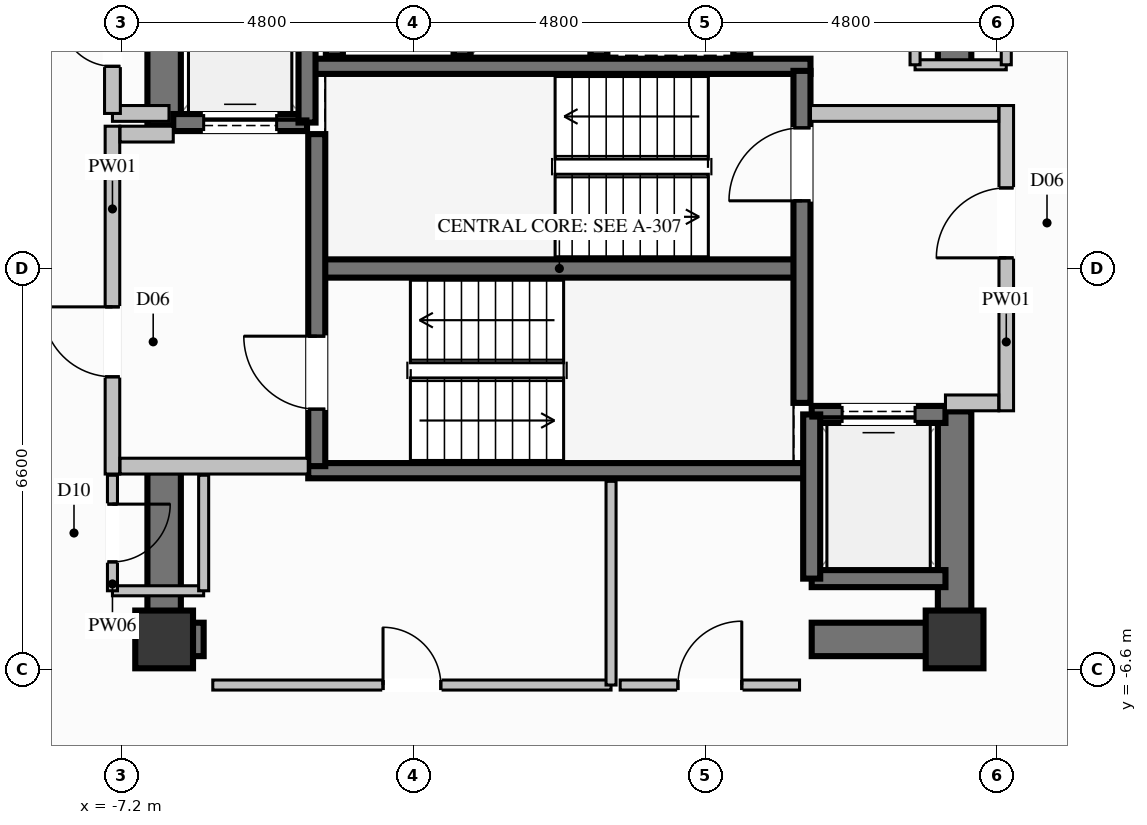
"""IFC4 building model, lengths in metres.
Left out: names, types, materials, properties, quantities, classifications, styles, units other than length and angle.
Written with IfcOpenShell. Run it as: python <this file> out.ifc"""

import sys

from ifc_helpers import new_model, si_unit, direction, frame, frame_2d, origin, origin_2d, place, context, subcontext, project, spatial, rectangle, extrude, element, fill, save


model = new_model("IFC4")
c1 = context("Model", 3, precision=1e-05, world=origin(), true_north=direction((0.0, 1.0)))
c2 = subcontext(c1, "Body", "Model", "MODEL_VIEW")
j1 = project(units=[si_unit("LENGTHUNIT", "METRE"), si_unit("PLANEANGLEUNIT", "RADIAN")], contexts=[c1])
p1 = place(None, origin())
s1 = spatial("IfcSite", under=j1, at=p1, CompositionType="ELEMENT")
p2 = place(p1, origin())
s2 = spatial("IfcBuilding", under=s1, at=p2, CompositionType="ELEMENT")
p3 = place(p2, frame((0.0, 0.0, 187.6)))
s3 = spatial("IfcBuildingStorey", under=s2, at=p3, CompositionType="ELEMENT", Elevation=187.6)
for number, where, z_axis, x_axis in (
    (1, (-6.5, -6.1, 0.0), (0.0, 0.0, 1.0), (1.0, 0.0, 0.0)),
    (2, (6.5, -6.1, 0.0), (0.0, 0.0, 1.0), (1.0, 0.0, 0.0)),
):
    element("IfcColumn", number, at=place(p3, frame(where, z_axis=z_axis, x_axis=x_axis)), inside=s3, PredefinedType="COLUMN", context=c2, shape_type="SweptSolid", body=[
        extrude(rectangle(XDim=0.95, YDim=0.95, at=origin_2d()), origin(), (0.0, 0.0, 1.0), 3.6),
    ])
p4 = place(p3, frame((-3.99, 0.0, 0.0), z_axis=(0.0, 0.0, 1.0), x_axis=(1.0, 0.0, 0.0)))
e3 = element("IfcWall", 3, at=p4, inside=s3, PredefinedType="SHEAR", context=c2, shape_type="SweptSolid", body=[
    extrude(rectangle(XDim=7.98, YDim=0.3, at=frame_2d((3.99, 0.0))), origin(), (0.0, 0.0, 1.0), 3.6),
])
for number, where, z_axis, x_axis in (
    (4, (-4.13, -3.325, 0.0), (0.0, 0.0, 1.0), (1.0, 0.0, 0.0)),
    (5, (-4.13, 3.325, 0.0), (0.0, 0.0, 1.0), (1.0, 0.0, 0.0)),
):
    element("IfcWall", number, at=place(p3, frame(where, z_axis=z_axis, x_axis=x_axis)), inside=s3, PredefinedType="SOLIDWALL", context=c2, shape_type="SweptSolid", body=[
        extrude(rectangle(XDim=8.26, YDim=0.25, at=frame_2d((4.13, 0.0))), origin(), (0.0, 0.0, 1.0), 3.6),
    ])
p5 = place(p3, frame((-6.225, -6.1, 0.0), z_axis=(0.0, 0.0, 1.0), x_axis=(1.0, 0.0, 0.0)))
e6 = element("IfcWall", 6, at=p5, inside=s3, PredefinedType="SHEAR", context=c2, shape_type="SweptSolid", body=[
    extrude(rectangle(XDim=0.375, YDim=0.55, at=frame_2d((0.188, 0.0))), origin(), (0.0, 0.0, 1.0), 3.6),
])
p6 = place(p3, frame((4.15, -6.1, 0.0), z_axis=(0.0, 0.0, 1.0), x_axis=(1.0, 0.0, 0.0)))
e7 = element("IfcWall", 7, at=p6, inside=s3, PredefinedType="SHEAR", context=c2, shape_type="SweptSolid", body=[
    extrude(rectangle(XDim=2.075, YDim=0.55, at=frame_2d((1.038, 0.0))), origin(), (0.0, 0.0, 1.0), 3.6),
])
p7 = place(p3, frame((-6.5, 2.35, 0.0), z_axis=(0.0, 0.0, 1.0), x_axis=(0.0, 1.0, 0.0)))
e8 = element("IfcWall", 8, at=p7, inside=s3, PredefinedType="SHEAR", context=c2, shape_type="SweptSolid", body=[
    extrude(rectangle(XDim=4.025, YDim=0.55, at=frame_2d((2.012, 0.0))), origin(), (0.0, 0.0, 1.0), 3.6),
])
p8 = place(p3, frame((-6.5, -6.375, 0.0), z_axis=(0.0, 0.0, 1.0), x_axis=(0.0, 1.0, 0.0)))
e9 = element("IfcWall", 9, at=p8, inside=s3, PredefinedType="SHEAR", context=c2, shape_type="SweptSolid", body=[
    extrude(rectangle(XDim=3.025, YDim=0.55, at=frame_2d((1.512, 0.0))), origin(), (0.0, 0.0, 1.0), 3.6),
])
p9 = place(p3, frame((6.5, -6.375, 0.0), z_axis=(0.0, 0.0, 1.0), x_axis=(0.0, 1.0, 0.0)))
e10 = element("IfcWall", 10, at=p9, inside=s3, PredefinedType="SHEAR", context=c2, shape_type="SweptSolid", body=[
    extrude(rectangle(XDim=4.025, YDim=0.55, at=frame_2d((2.012, 0.0))), origin(), (0.0, 0.0, 1.0), 3.6),
])
p10 = place(p3, frame((6.5, 3.35, 0.0), z_axis=(0.0, 0.0, 1.0), x_axis=(0.0, 1.0, 0.0)))
e11 = element("IfcWall", 11, at=p10, inside=s3, PredefinedType="SHEAR", context=c2, shape_type="SweptSolid", body=[
    extrude(rectangle(XDim=3.025, YDim=0.55, at=frame_2d((1.512, 0.0))), origin(), (0.0, 0.0, 1.0), 3.6),
])
for number, where, z_axis, x_axis in (
    (12, (-3.7, 6.0, 0.0), (0.0, 0.0, 1.0), (0.0, -1.0, 0.0)),
    (13, (-1.6, 3.5, 0.0), (0.0, 0.0, 1.0), (0.0, 1.0, 0.0)),
    (14, (0.65, 3.5, 0.0), (0.0, 0.0, 1.0), (0.0, 1.0, 0.0)),
    (15, (3.0, 3.5, 0.0), (0.0, 0.0, 1.0), (0.0, 1.0, 0.0)),
):
    element("IfcWall", number, at=place(p3, frame(where, z_axis=z_axis, x_axis=x_axis)), inside=s3, PredefinedType="SOLIDWALL", context=c2, shape_type="SweptSolid", body=[
        extrude(rectangle(XDim=2.5, YDim=0.28, at=frame_2d((1.25, 0.0))), origin(), (0.0, 0.0, 1.0), 3.36),
    ])
p11 = place(p3, frame((-6.35, 2.4, 0.0), z_axis=(0.0, 0.0, 1.0), x_axis=(1.0, 0.0, 0.0)))
e16 = element("IfcWall", 16, at=p11, inside=s3, PredefinedType="SOLIDWALL", context=c2, shape_type="SweptSolid", body=[
    extrude(rectangle(XDim=2.2, YDim=0.28, at=frame_2d((1.1, 0.0))), origin(), (0.0, 0.0, 1.0), 3.36),
])
p12 = place(p11, frame((0.5, 0.0, 0.0)))
e17 = element("IfcOpeningElement", 17, at=p12, cuts=e16, PredefinedType="OPENING", context=c2, shape_type="SweptSolid", body=[
    extrude(rectangle(XDim=1.2, YDim=2.2, at=frame_2d((0.6, 1.1))), frame((0.0, 0.15, 0.0), z_axis=(0.0, -1.0, 0.0), x_axis=(1.0, 0.0, 0.0)), (0.0, 0.0, 1.0), 0.3),
])
p13 = place(p3, frame((-4.15, 2.4, 0.0), z_axis=(0.0, 0.0, 1.0), x_axis=(0.0, 1.0, 0.0)))
e18 = element("IfcWall", 18, at=p13, inside=s3, PredefinedType="SOLIDWALL", context=c2, shape_type="SweptSolid", body=[
    extrude(rectangle(XDim=2.7, YDim=0.28, at=frame_2d((1.35, 0.0))), origin(), (0.0, 0.0, 1.0), 3.36),
])
p14 = place(p3, frame((4.15, -5.1, 0.0), z_axis=(0.0, 0.0, 1.0), x_axis=(1.0, 0.0, 0.0)))
e19 = element("IfcWall", 19, at=p14, inside=s3, PredefinedType="SOLIDWALL", context=c2, shape_type="SweptSolid", body=[
    extrude(rectangle(XDim=2.2, YDim=0.28, at=frame_2d((1.1, 0.0))), origin(), (0.0, 0.0, 1.0), 3.36),
])
p15 = place(p3, frame((6.35, -2.4, 0.0), z_axis=(0.0, 0.0, 1.0), x_axis=(-1.0, 0.0, 0.0)))
e20 = element("IfcWall", 20, at=p15, inside=s3, PredefinedType="SOLIDWALL", context=c2, shape_type="SweptSolid", body=[
    extrude(rectangle(XDim=2.2, YDim=0.28, at=frame_2d((1.1, 0.0))), origin(), (0.0, 0.0, 1.0), 3.36),
])
p16 = place(p15, frame((0.5, 0.0, 0.0)))
e21 = element("IfcOpeningElement", 21, at=p16, cuts=e20, PredefinedType="OPENING", context=c2, shape_type="SweptSolid", body=[
    extrude(rectangle(XDim=1.2, YDim=2.2, at=frame_2d((0.6, 1.1))), frame((0.0, 0.15, 0.0), z_axis=(0.0, -1.0, 0.0), x_axis=(1.0, 0.0, 0.0)), (0.0, 0.0, 1.0), 0.3),
])
p17 = place(p3, frame((4.15, -2.4, 0.0), z_axis=(0.0, 0.0, 1.0), x_axis=(0.0, -1.0, 0.0)))
e22 = element("IfcWall", 22, at=p17, inside=s3, PredefinedType="SOLIDWALL", context=c2, shape_type="SweptSolid", body=[
    extrude(rectangle(XDim=2.7, YDim=0.28, at=frame_2d((1.35, 0.0))), origin(), (0.0, 0.0, 1.0), 3.36),
])
p18 = place(p3, frame((-3.99, -3.25, 0.0), z_axis=(0.0, 0.0, 1.0), x_axis=(0.0, 1.0, 0.0)))
e23 = element("IfcWall", 23, at=p18, inside=s3, PredefinedType="SOLIDWALL", context=c2, shape_type="SweptSolid", body=[
    extrude(rectangle(XDim=5.46, YDim=0.28, at=frame_2d((2.73, 0.0))), origin(), (0.0, 0.0, 1.0), 3.36),
])
p19 = place(p18, frame((0.937, 0.0, 0.0)))
e24 = element("IfcOpeningElement", 24, at=p19, cuts=e23, PredefinedType="OPENING", context=c2, shape_type="SweptSolid", body=[
    extrude(rectangle(XDim=1.2, YDim=2.2, at=frame_2d((0.6, 1.1))), frame((0.0, 0.15, 0.0), z_axis=(0.0, -1.0, 0.0), x_axis=(1.0, 0.0, 0.0)), (0.0, 0.0, 1.0), 0.3),
])
p20 = place(p3, frame((3.99, -2.21, 0.0), z_axis=(0.0, 0.0, 1.0), x_axis=(0.0, 1.0, 0.0)))
e25 = element("IfcWall", 25, at=p20, inside=s3, PredefinedType="SOLIDWALL", context=c2, shape_type="SweptSolid", body=[
    extrude(rectangle(XDim=5.46, YDim=0.28, at=frame_2d((2.73, 0.0))), origin(), (0.0, 0.0, 1.0), 3.36),
])
p21 = place(p20, frame((3.323, 0.0, 0.0)))
e26 = element("IfcOpeningElement", 26, at=p21, cuts=e25, PredefinedType="OPENING", context=c2, shape_type="SweptSolid", body=[
    extrude(rectangle(XDim=1.2, YDim=2.2, at=frame_2d((0.6, 1.1))), frame((0.0, 0.15, 0.0), z_axis=(0.0, -1.0, 0.0), x_axis=(1.0, 0.0, 0.0)), (0.0, 0.0, 1.0), 0.3),
])
p22 = place(p3, frame((-7.35, -3.38, 0.0), z_axis=(0.0, 0.0, 1.0), x_axis=(0.0, 1.0, 0.0)))
e27 = element("IfcWall", 27, at=p22, inside=s3, PredefinedType="PARTITIONING", context=c2, shape_type="SweptSolid", body=[
    extrude(rectangle(XDim=5.72, YDim=0.24, at=frame_2d((2.86, 0.0))), origin(), (0.0, 0.0, 1.0), 2.445),
])
p23 = place(p22, frame((1.599, 0.0, 0.0)))
e28 = element("IfcOpeningElement", 28, at=p23, cuts=e27, PredefinedType="OPENING", context=c2, shape_type="SweptSolid", body=[
    extrude(rectangle(XDim=1.15, YDim=2.2, at=frame_2d((0.575, 1.1))), frame((0.0, 0.13, 0.0), z_axis=(0.0, -1.0, 0.0), x_axis=(1.0, 0.0, 0.0)), (0.0, 0.0, 1.0), 0.26),
])
p24 = place(p3, frame((-7.225, -3.25, 0.0), z_axis=(0.0, 0.0, 1.0), x_axis=(1.0, 0.0, 0.0)))
e29 = element("IfcWall", 29, at=p24, inside=s3, PredefinedType="PARTITIONING", context=c2, shape_type="SweptSolid", body=[
    extrude(rectangle(XDim=3.095, YDim=0.26, at=frame_2d((1.548, 0.0))), origin(), (0.0, 0.0, 1.0), 3.36),
])
p25 = place(p3, frame((-7.225, 2.21, 0.0), z_axis=(0.0, 0.0, 1.0), x_axis=(1.0, 0.0, 0.0)))
e30 = element("IfcWall", 30, at=p25, inside=s3, PredefinedType="PARTITIONING", context=c2, shape_type="SweptSolid", body=[
    extrude(rectangle(XDim=0.875, YDim=0.26, at=frame_2d((0.438, 0.0))), origin(), (0.0, 0.0, 1.0), 3.36),
])
p26 = place(p3, frame((7.35, -2.34, 0.0), z_axis=(0.0, 0.0, 1.0), x_axis=(0.0, 1.0, 0.0)))
e31 = element("IfcWall", 31, at=p26, inside=s3, PredefinedType="PARTITIONING", context=c2, shape_type="SweptSolid", body=[
    extrude(rectangle(XDim=5.02, YDim=0.24, at=frame_2d((2.51, 0.0))), origin(), (0.0, 0.0, 1.0), 2.445),
])
p27 = place(p26, frame((2.515, 0.0, 0.0)))
e32 = element("IfcOpeningElement", 32, at=p27, cuts=e31, PredefinedType="OPENING", context=c2, shape_type="SweptSolid", body=[
    extrude(rectangle(XDim=1.15, YDim=2.2, at=frame_2d((0.575, 1.1))), frame((0.0, 0.13, 0.0), z_axis=(0.0, -1.0, 0.0), x_axis=(1.0, 0.0, 0.0)), (0.0, 0.0, 1.0), 0.26),
])
p28 = place(p3, frame((6.35, -2.21, 0.0), z_axis=(0.0, 0.0, 1.0), x_axis=(1.0, 0.0, 0.0)))
e33 = element("IfcWall", 33, at=p28, inside=s3, PredefinedType="PARTITIONING", context=c2, shape_type="SweptSolid", body=[
    extrude(rectangle(XDim=0.875, YDim=0.26, at=frame_2d((0.438, 0.0))), origin(), (0.0, 0.0, 1.0), 3.36),
])
p29 = place(p3, frame((4.13, 2.55, 0.0), z_axis=(0.0, 0.0, 1.0), x_axis=(1.0, 0.0, 0.0)))
e34 = element("IfcWall", 34, at=p29, inside=s3, PredefinedType="PARTITIONING", context=c2, shape_type="SweptSolid", body=[
    extrude(rectangle(XDim=3.095, YDim=0.26, at=frame_2d((1.548, 0.0))), origin(), (0.0, 0.0, 1.0), 3.36),
])
p30 = place(p3, frame((-7.35, 2.55, 0.0), z_axis=(0.0, 0.0, 1.0), x_axis=(1.0, 0.0, 0.0)))
e35 = element("IfcWall", 35, at=p30, inside=s3, PredefinedType="PARTITIONING", context=c2, shape_type="SweptSolid", body=[
    extrude(rectangle(XDim=0.93, YDim=0.26, at=frame_2d((0.465, 0.0))), origin(), (0.0, 0.0, 1.0), 3.36),
])
p31 = place(p3, frame((-7.35, 2.55, 0.0), z_axis=(0.0, 0.0, 1.0), x_axis=(0.0, 1.0, 0.0)))
e36 = element("IfcWall", 36, at=p31, inside=s3, PredefinedType="PARTITIONING", context=c2, shape_type="SweptSolid", body=[
    extrude(rectangle(XDim=2.4, YDim=0.26, at=frame_2d((1.2, 0.0))), origin(), (0.0, 0.0, 1.0), 2.445),
])
p32 = place(p31, frame((0.775, 0.0, 0.0)))
e37 = element("IfcOpeningElement", 37, at=p32, cuts=e36, PredefinedType="OPENING", context=c2, shape_type="SweptSolid", body=[
    extrude(rectangle(XDim=0.85, YDim=2.05, at=frame_2d((0.425, 1.025))), frame((0.0, 0.14, 0.0), z_axis=(0.0, -1.0, 0.0), x_axis=(1.0, 0.0, 0.0)), (0.0, 0.0, 1.0), 0.28),
])
p33 = place(p3, frame((-7.35, -5.3, 0.0), z_axis=(0.0, 0.0, 1.0), x_axis=(1.0, 0.0, 0.0)))
e38 = element("IfcWall", 38, at=p33, inside=s3, PredefinedType="PARTITIONING", context=c2, shape_type="SweptSolid", body=[
    extrude(rectangle(XDim=1.5, YDim=0.165, at=frame_2d((0.75, 0.0))), origin(), (0.0, 0.0, 1.0), 2.445),
])
p34 = place(p3, frame((-5.85, -5.3, 0.0), z_axis=(0.0, 0.0, 1.0), x_axis=(0.0, 1.0, 0.0)))
e39 = element("IfcWall", 39, at=p34, inside=s3, PredefinedType="PARTITIONING", context=c2, shape_type="SweptSolid", body=[
    extrude(rectangle(XDim=1.9, YDim=0.165, at=frame_2d((0.95, 0.0))), origin(), (0.0, 0.0, 1.0), 2.445),
])
p35 = place(p3, frame((-7.35, -3.4, 0.0), z_axis=(0.0, 0.0, 1.0), x_axis=(0.0, -1.0, 0.0)))
e40 = element("IfcWall", 40, at=p35, inside=s3, PredefinedType="PARTITIONING", context=c2, shape_type="SweptSolid", body=[
    extrude(rectangle(XDim=1.9, YDim=0.165, at=frame_2d((0.95, 0.0))), origin(), (0.0, 0.0, 1.0), 3.36),
])
p36 = place(p35, frame((0.475, 0.0, 0.0)))
e41 = element("IfcOpeningElement", 41, at=p36, cuts=e40, PredefinedType="OPENING", context=c2, shape_type="SweptSolid", body=[
    extrude(rectangle(XDim=0.95, YDim=2.1, at=frame_2d((0.475, 1.05))), frame((0.0, 0.093, 0.0), z_axis=(0.0, -1.0, 0.0), x_axis=(1.0, 0.0, 0.0)), (0.0, 0.0, 1.0), 0.185),
])
p37 = place(p3, frame((5.85, 3.35, 0.0), z_axis=(0.0, 0.0, 1.0), x_axis=(1.0, 0.0, 0.0)))
e42 = element("IfcWall", 42, at=p37, inside=s3, PredefinedType="PARTITIONING", context=c2, shape_type="SweptSolid", body=[
    extrude(rectangle(XDim=1.5, YDim=0.165, at=frame_2d((0.75, 0.0))), origin(), (0.0, 0.0, 1.0), 3.36),
])
p38 = place(p3, frame((7.35, 3.35, 0.0), z_axis=(0.0, 0.0, 1.0), x_axis=(0.0, 1.0, 0.0)))
e43 = element("IfcWall", 43, at=p38, inside=s3, PredefinedType="PARTITIONING", context=c2, shape_type="SweptSolid", body=[
    extrude(rectangle(XDim=1.95, YDim=0.165, at=frame_2d((0.975, 0.0))), origin(), (0.0, 0.0, 1.0), 3.36),
])
p39 = place(p38, frame((0.5, 0.0, 0.0)))
e44 = element("IfcOpeningElement", 44, at=p39, cuts=e43, PredefinedType="OPENING", context=c2, shape_type="SweptSolid", body=[
    extrude(rectangle(XDim=0.95, YDim=2.1, at=frame_2d((0.475, 1.05))), frame((0.0, 0.093, 0.0), z_axis=(0.0, -1.0, 0.0), x_axis=(1.0, 0.0, 0.0)), (0.0, 0.0, 1.0), 0.185),
])
p40 = place(p3, frame((5.85, 5.3, 0.0), z_axis=(0.0, 0.0, 1.0), x_axis=(0.0, -1.0, 0.0)))
e45 = element("IfcWall", 45, at=p40, inside=s3, PredefinedType="PARTITIONING", context=c2, shape_type="SweptSolid", body=[
    extrude(rectangle(XDim=1.95, YDim=0.165, at=frame_2d((0.975, 0.0))), origin(), (0.0, 0.0, 1.0), 2.445),
])
p41 = place(p3, frame((-5.7, -6.85, 0.0), z_axis=(0.0, 0.0, 1.0), x_axis=(1.0, 0.0, 0.0)))
e46 = element("IfcWall", 46, at=p41, inside=s3, PredefinedType="PARTITIONING", context=c2, shape_type="SweptSolid", body=[
    extrude(rectangle(XDim=6.55, YDim=0.165, at=frame_2d((3.275, 0.0))), origin(), (0.0, 0.0, 1.0), 2.445),
])
p42 = place(p41, frame((2.8, 0.0, 0.0)))
e47 = element("IfcOpeningElement", 47, at=p42, cuts=e46, PredefinedType="OPENING", context=c2, shape_type="SweptSolid", body=[
    extrude(rectangle(XDim=0.95, YDim=2.1, at=frame_2d((0.475, 1.05))), frame((0.0, 0.093, 0.0), z_axis=(0.0, -1.0, 0.0), x_axis=(1.0, 0.0, 0.0)), (0.0, 0.0, 1.0), 0.185),
])
p43 = place(p3, frame((0.85, -6.85, 0.0), z_axis=(0.0, 0.0, 1.0), x_axis=(0.0, 1.0, 0.0)))
e48 = element("IfcWall", 48, at=p43, inside=s3, PredefinedType="PARTITIONING", context=c2, shape_type="SweptSolid", body=[
    extrude(rectangle(XDim=3.35, YDim=0.165, at=frame_2d((1.675, 0.0))), origin(), (0.0, 0.0, 1.0), 3.36),
])
p44 = place(p3, frame((1.0, -6.85, 0.0), z_axis=(0.0, 0.0, 1.0), x_axis=(1.0, 0.0, 0.0)))
e49 = element("IfcWall", 49, at=p44, inside=s3, PredefinedType="PARTITIONING", context=c2, shape_type="SweptSolid", body=[
    extrude(rectangle(XDim=2.95, YDim=0.165, at=frame_2d((1.475, 0.0))), origin(), (0.0, 0.0, 1.0), 2.445),
])
p45 = place(p44, frame((0.95, 0.0, 0.0)))
e50 = element("IfcOpeningElement", 50, at=p45, cuts=e49, PredefinedType="OPENING", context=c2, shape_type="SweptSolid", body=[
    extrude(rectangle(XDim=1.05, YDim=2.15, at=frame_2d((0.525, 1.075))), frame((0.0, 0.093, 0.0), z_axis=(0.0, -1.0, 0.0), x_axis=(1.0, 0.0, 0.0)), (0.0, 0.0, 1.0), 0.185),
])
p46 = place(p12, origin())
e51 = element("IfcDoor", 51, at=p46, inside=s3, OperationType="SLIDING_TO_LEFT", PredefinedType="DOOR", context=c2, shape_type="SweptSolid", body=[
    extrude(rectangle(XDim=1.2, YDim=2.2, at=frame_2d((0.6, 1.1))), frame((0.0, 0.025, 0.0), z_axis=(0.0, -1.0, 0.0), x_axis=(1.0, 0.0, 0.0)), (0.0, 0.0, 1.0), 0.05),
])
fill(e17, e51)
p47 = place(p16, origin())
e52 = element("IfcDoor", 52, at=p47, inside=s3, OperationType="SLIDING_TO_LEFT", PredefinedType="DOOR", context=c2, shape_type="SweptSolid", body=[
    extrude(rectangle(XDim=1.2, YDim=2.2, at=frame_2d((0.6, 1.1))), frame((0.0, 0.025, 0.0), z_axis=(0.0, -1.0, 0.0), x_axis=(1.0, 0.0, 0.0)), (0.0, 0.0, 1.0), 0.05),
])
fill(e21, e52)
p48 = place(p19, origin())
e53 = element("IfcDoor", 53, at=p48, inside=s3, OperationType="SINGLE_SWING_RIGHT", PredefinedType="DOOR", context=c2, shape_type="SweptSolid", body=[
    extrude(rectangle(XDim=1.2, YDim=2.2, at=frame_2d((0.6, 1.1))), frame((0.0, 0.025, 0.0), z_axis=(0.0, -1.0, 0.0), x_axis=(1.0, 0.0, 0.0)), (0.0, 0.0, 1.0), 0.05),
])
fill(e24, e53)
p49 = place(p21, origin())
e54 = element("IfcDoor", 54, at=p49, inside=s3, OperationType="SINGLE_SWING_LEFT", PredefinedType="DOOR", context=c2, shape_type="SweptSolid", body=[
    extrude(rectangle(XDim=1.2, YDim=2.2, at=frame_2d((0.6, 1.1))), frame((0.0, 0.025, 0.0), z_axis=(0.0, -1.0, 0.0), x_axis=(1.0, 0.0, 0.0)), (0.0, 0.0, 1.0), 0.05),
])
fill(e26, e54)
p50 = place(p23, origin())
e55 = element("IfcDoor", 55, at=p50, inside=s3, OperationType="SINGLE_SWING_RIGHT", PredefinedType="DOOR", context=c2, shape_type="SweptSolid", body=[
    extrude(rectangle(XDim=1.15, YDim=2.2, at=frame_2d((0.575, 1.1))), frame((0.0, 0.025, 0.0), z_axis=(0.0, -1.0, 0.0), x_axis=(1.0, 0.0, 0.0)), (0.0, 0.0, 1.0), 0.05),
])
fill(e28, e55)
p51 = place(p27, origin())
e56 = element("IfcDoor", 56, at=p51, inside=s3, OperationType="SINGLE_SWING_LEFT", PredefinedType="DOOR", context=c2, shape_type="SweptSolid", body=[
    extrude(rectangle(XDim=1.15, YDim=2.2, at=frame_2d((0.575, 1.1))), frame((0.0, 0.025, 0.0), z_axis=(0.0, -1.0, 0.0), x_axis=(1.0, 0.0, 0.0)), (0.0, 0.0, 1.0), 0.05),
])
fill(e32, e56)
p52 = place(p32, origin())
e57 = element("IfcDoor", 57, at=p52, inside=s3, OperationType="SINGLE_SWING_RIGHT", PredefinedType="DOOR", context=c2, shape_type="SweptSolid", body=[
    extrude(rectangle(XDim=0.85, YDim=2.05, at=frame_2d((0.425, 1.025))), frame((0.0, 0.025, 0.0), z_axis=(0.0, -1.0, 0.0), x_axis=(1.0, 0.0, 0.0)), (0.0, 0.0, 1.0), 0.05),
])
fill(e37, e57)
p53 = place(p36, origin())
e58 = element("IfcDoor", 58, at=p53, inside=s3, OperationType="SINGLE_SWING_LEFT", PredefinedType="DOOR", context=c2, shape_type="SweptSolid", body=[
    extrude(rectangle(XDim=0.95, YDim=2.1, at=frame_2d((0.475, 1.05))), frame((0.0, 0.025, 0.0), z_axis=(0.0, -1.0, 0.0), x_axis=(1.0, 0.0, 0.0)), (0.0, 0.0, 1.0), 0.05),
])
fill(e41, e58)
p54 = place(p42, origin())
e59 = element("IfcDoor", 59, at=p54, inside=s3, OperationType="SINGLE_SWING_LEFT", PredefinedType="DOOR", context=c2, shape_type="SweptSolid", body=[
    extrude(rectangle(XDim=0.95, YDim=2.1, at=frame_2d((0.475, 1.05))), frame((0.0, 0.025, 0.0), z_axis=(0.0, -1.0, 0.0), x_axis=(1.0, 0.0, 0.0)), (0.0, 0.0, 1.0), 0.05),
])
fill(e47, e59)
p55 = place(p45, origin())
e60 = element("IfcDoor", 60, at=p55, inside=s3, OperationType="SINGLE_SWING_RIGHT", PredefinedType="DOOR", context=c2, shape_type="SweptSolid", body=[
    extrude(rectangle(XDim=1.05, YDim=2.15, at=frame_2d((0.525, 1.075))), frame((0.0, 0.025, 0.0), z_axis=(0.0, -1.0, 0.0), x_axis=(1.0, 0.0, 0.0)), (0.0, 0.0, 1.0), 0.05),
])
fill(e50, e60)
save(model, sys.argv[1])
